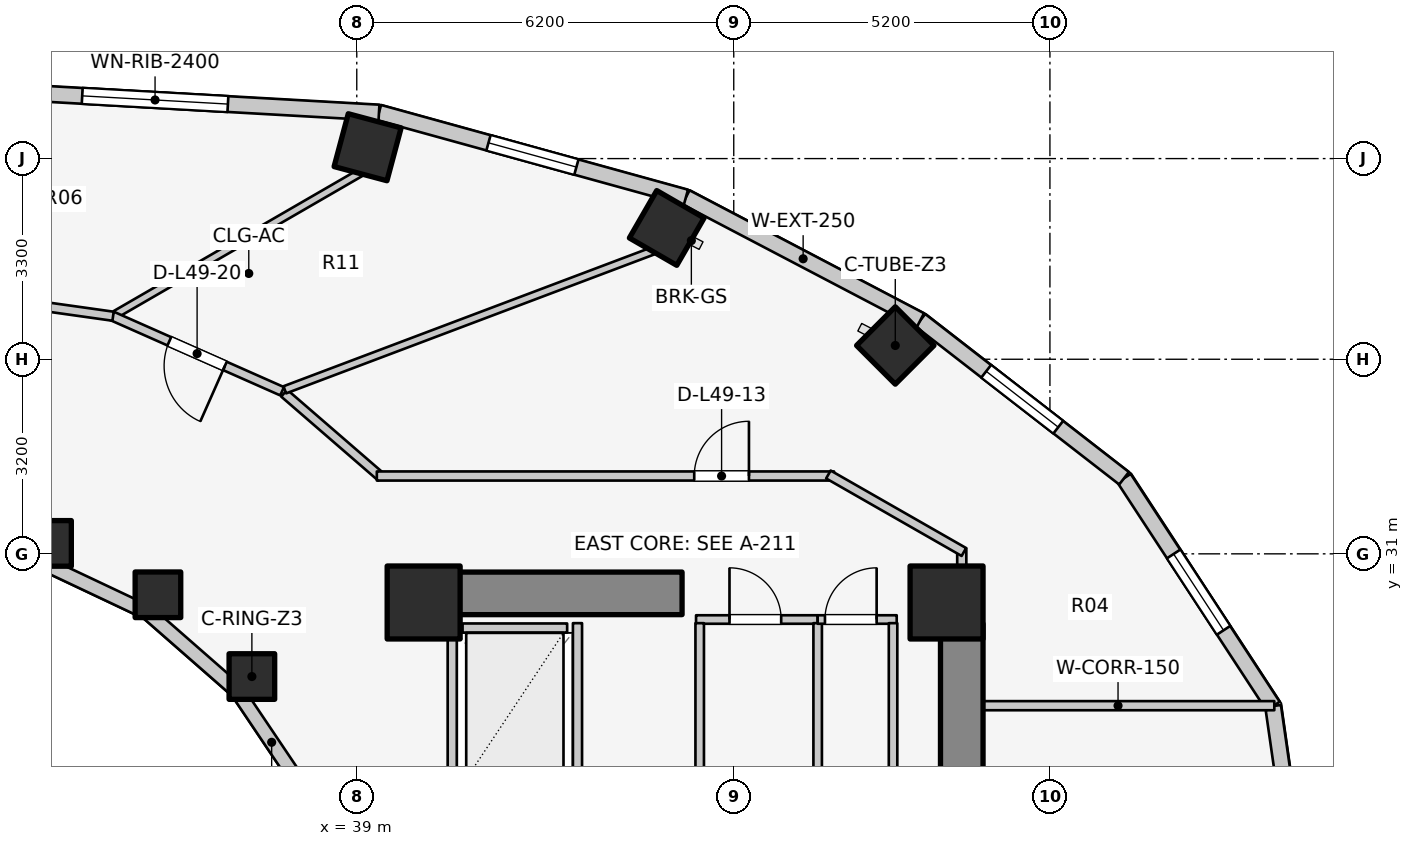
"""IFC4 building model, lengths in metres.
Left out: names, types, materials, properties, quantities, classifications, styles, units other than length and angle.
Written with IfcOpenShell. Run it as: python <this file> out.ifc"""

import sys

from ifc_helpers import new_model, si_unit, direction, frame, frame_2d, origin, origin_2d, place, context, subcontext, project, spatial, rectangle, extrude, element, fill, save


model = new_model("IFC4")
c1 = context("Model", 3, precision=1e-05, world=origin(), true_north=direction((0.0, 1.0)))
c2 = subcontext(c1, "Body", "Model", "MODEL_VIEW")
j1 = project(units=[si_unit("LENGTHUNIT", "METRE"), si_unit("PLANEANGLEUNIT", "RADIAN")], contexts=[c1])
p1 = place(None, origin())
s1 = spatial("IfcSite", under=j1, at=p1, CompositionType="ELEMENT")
p2 = place(p1, origin())
s2 = spatial("IfcBuilding", under=s1, at=p2, CompositionType="ELEMENT")
p3 = place(p2, frame((0.0, 0.0, 162.2)))
s3 = spatial("IfcBuildingStorey", under=s2, at=p3, CompositionType="ELEMENT", Elevation=162.2)
p4 = place(p3, frame((48.95, 17.05, 0.0), z_axis=(0.0, 0.0, 1.0), x_axis=(0.0, 1.0, 0.0)))
e1 = element("IfcWall", 1, at=p4, inside=s3, PredefinedType="SHEAR", context=c2, shape_type="SweptSolid", body=[
    extrude(rectangle(XDim=12.8, YDim=0.7, at=frame_2d((6.4, 0.0))), origin(), (0.0, 0.0, 1.0), 3.1),
])
p5 = place(p3, frame((39.85, 30.35, 0.0), z_axis=(0.0, 0.0, 1.0), x_axis=(1.0, 0.0, 0.0)))
e2 = element("IfcWall", 2, at=p5, inside=s3, PredefinedType="SHEAR", context=c2, shape_type="SweptSolid", body=[
    extrude(rectangle(XDim=4.5, YDim=0.7, at=frame_2d((2.25, 0.0))), origin(), (0.0, 0.0, 1.0), 3.1),
])
for number, where, z_axis, x_axis in (
    (3, (48.7, 30.2, 0.0), (0.0, 0.0, 1.0), (1.0, 0.0, 0.0)),
    (4, (40.1, 30.2, 0.0), (0.0, 0.0, 1.0), (1.0, 0.0, 0.0)),
):
    element("IfcColumn", number, at=place(p3, frame(where, z_axis=z_axis, x_axis=x_axis)), inside=s3, PredefinedType="COLUMN", context=c2, shape_type="SweptSolid", body=[
        extrude(rectangle(XDim=1.2, YDim=1.2, at=origin_2d()), origin(), (0.0, 0.0, 1.0), 3.1),
    ])
p6 = place(p3, frame((37.275, 28.982, 0.0), z_axis=(0.0, 0.0, 1.0), x_axis=(1.0, 0.0, 0.0)))
e5 = element("IfcColumn", 5, at=p6, inside=s3, PredefinedType="COLUMN", context=c2, shape_type="SweptSolid", body=[
    extrude(rectangle(XDim=0.75, YDim=0.75, at=origin_2d()), origin(), (0.0, 0.0, 1.0), 3.1),
])
p7 = place(p3, frame((47.857, 34.427, 0.0), z_axis=(0.0, 0.0, 1.0), x_axis=(0.707106781187, 0.707106781187, 0.0)))
e6 = element("IfcColumn", 6, at=p7, inside=s3, PredefinedType="COLUMN", context=c2, shape_type="SweptSolid", body=[
    extrude(rectangle(XDim=0.9, YDim=0.9, at=origin_2d()), origin(), (0.0, 0.0, 1.0), 3.1),
])
p8 = place(p3, frame((35.73, 30.327, 0.0), z_axis=(0.0, 0.0, 1.0), x_axis=(1.0, 0.0, 0.0)))
e7 = element("IfcColumn", 7, at=p8, inside=s3, PredefinedType="COLUMN", context=c2, shape_type="SweptSolid", body=[
    extrude(rectangle(XDim=0.75, YDim=0.75, at=origin_2d()), origin(), (0.0, 0.0, 1.0), 3.1),
])
p9 = place(p3, frame((44.098, 36.359, 0.0), z_axis=(0.0, 0.0, 1.0), x_axis=(0.5, 0.866025403784, 0.0)))
e8 = element("IfcColumn", 8, at=p9, inside=s3, PredefinedType="COLUMN", context=c2, shape_type="SweptSolid", body=[
    extrude(rectangle(XDim=0.9, YDim=0.9, at=origin_2d()), origin(), (0.0, 0.0, 1.0), 3.1),
])
p10 = place(p3, frame((33.931, 31.172, 0.0), z_axis=(0.0, 0.0, 1.0), x_axis=(1.0, 0.0, 0.0)))
e9 = element("IfcColumn", 9, at=p10, inside=s3, PredefinedType="COLUMN", context=c2, shape_type="SweptSolid", body=[
    extrude(rectangle(XDim=0.75, YDim=0.75, at=origin_2d()), origin(), (0.0, 0.0, 1.0), 3.1),
])
p11 = place(p3, frame((39.178, 37.687, 0.0), z_axis=(0.0, 0.0, 1.0), x_axis=(0.258819045103, 0.965925826289, 0.0)))
e10 = element("IfcColumn", 10, at=p11, inside=s3, PredefinedType="COLUMN", context=c2, shape_type="SweptSolid", body=[
    extrude(rectangle(XDim=0.9, YDim=0.9, at=origin_2d()), origin(), (0.0, 0.0, 1.0), 3.1),
])
p12 = place(p3, frame((38.166, 27.06, 0.0), z_axis=(0.0, 0.0, 1.0), x_axis=(-0.558197800898, 0.829707909492, 0.0)))
e11 = element("IfcWall", 11, at=p12, inside=s3, PredefinedType="STANDARD", context=c2, shape_type="SweptSolid", body=[
    extrude(rectangle(XDim=2.027, YDim=0.23, at=frame_2d((1.013, 0.0))), origin(), (0.0, 0.0, 1.0), 2.16),
])
p13 = place(p3, frame((37.035, 28.742, 0.0), z_axis=(0.0, 0.0, 1.0), x_axis=(-0.752576694707, 0.658504607869, 0.0)))
e12 = element("IfcWall", 12, at=p13, inside=s3, PredefinedType="STANDARD", context=c2, shape_type="SweptSolid", body=[
    extrude(rectangle(XDim=1.959, YDim=0.23, at=frame_2d((0.98, 0.0))), origin(), (0.0, 0.0, 1.0), 2.16),
])
p14 = place(p3, frame((35.56, 30.032, 0.0), z_axis=(0.0, 0.0, 1.0), x_axis=(-0.904179699603, 0.427152280606, 0.0)))
e13 = element("IfcWall", 13, at=p14, inside=s3, PredefinedType="STANDARD", context=c2, shape_type="SweptSolid", body=[
    extrude(rectangle(XDim=1.899, YDim=0.23, at=frame_2d((0.95, 0.0))), origin(), (0.0, 0.0, 1.0), 2.16),
])
p15 = place(p3, frame((54.86, 23.0, 0.0), z_axis=(0.0, 0.0, 1.0), x_axis=(-0.142227632286, 0.989833976288, 0.0)))
e14 = element("IfcWall", 14, at=p15, inside=s3, PredefinedType="STANDARD", context=c2, shape_type="SweptSolid", body=[
    extrude(rectangle(XDim=5.553, YDim=0.26, at=frame_2d((2.776, 0.0))), origin(), (0.0, 0.0, 1.0), 2.85),
])
p16 = place(p15, frame((2.027, 0.0, 0.75)))
e15 = element("IfcOpeningElement", 15, at=p16, cuts=e14, PredefinedType="OPENING", context=c2, shape_type="SweptSolid", body=[
    extrude(rectangle(XDim=1.5, YDim=1.6, at=frame_2d((0.75, 0.8))), frame((0.0, 0.14, 0.0), z_axis=(0.0, -1.0, 0.0), x_axis=(1.0, 0.0, 0.0)), (0.0, 0.0, 1.0), 0.28),
])
p17 = place(p3, frame((54.07, 28.497, 0.0), z_axis=(0.0, 0.0, 1.0), x_axis=(-0.547456494366, 0.836834145322, 0.0)))
e16 = element("IfcWall", 16, at=p17, inside=s3, PredefinedType="STANDARD", context=c2, shape_type="SweptSolid", body=[
    extrude(rectangle(XDim=4.477, YDim=0.26, at=frame_2d((2.239, 0.0))), origin(), (0.0, 0.0, 1.0), 2.85),
])
p18 = place(p17, frame((1.489, 0.0, 0.75)))
e17 = element("IfcOpeningElement", 17, at=p18, cuts=e16, PredefinedType="OPENING", context=c2, shape_type="SweptSolid", body=[
    extrude(rectangle(XDim=1.5, YDim=1.6, at=frame_2d((0.75, 0.8))), frame((0.0, 0.14, 0.0), z_axis=(0.0, -1.0, 0.0), x_axis=(1.0, 0.0, 0.0)), (0.0, 0.0, 1.0), 0.28),
])
p19 = place(p3, frame((51.619, 32.243, 0.0), z_axis=(0.0, 0.0, 1.0), x_axis=(-0.790185650662, 0.612867552973, 0.0)))
e18 = element("IfcWall", 18, at=p19, inside=s3, PredefinedType="STANDARD", context=c2, shape_type="SweptSolid", body=[
    extrude(rectangle(XDim=4.239, YDim=0.26, at=frame_2d((2.12, 0.0))), origin(), (0.0, 0.0, 1.0), 2.85),
])
p20 = place(p19, frame((1.37, 0.0, 0.75)))
e19 = element("IfcOpeningElement", 19, at=p20, cuts=e18, PredefinedType="OPENING", context=c2, shape_type="SweptSolid", body=[
    extrude(rectangle(XDim=1.5, YDim=1.6, at=frame_2d((0.75, 0.8))), frame((0.0, 0.14, 0.0), z_axis=(0.0, -1.0, 0.0), x_axis=(1.0, 0.0, 0.0)), (0.0, 0.0, 1.0), 0.28),
])
p21 = place(p3, frame((48.269, 34.842, 0.0), z_axis=(0.0, 0.0, 1.0), x_axis=(-0.885660265226, 0.464333818065, 0.0)))
e20 = element("IfcWall", 20, at=p21, inside=s3, PredefinedType="STANDARD", context=c2, shape_type="SweptSolid", body=[
    extrude(rectangle(XDim=4.354, YDim=0.26, at=frame_2d((2.177, 0.0))), origin(), (0.0, 0.0, 1.0), 2.85),
])
p22 = place(p3, frame((44.413, 36.863, 0.0), z_axis=(0.0, 0.0, 1.0), x_axis=(-0.963953455704, 0.26607092144, 0.0)))
e21 = element("IfcWall", 21, at=p22, inside=s3, PredefinedType="STANDARD", context=c2, shape_type="SweptSolid", body=[
    extrude(rectangle(XDim=5.237, YDim=0.26, at=frame_2d((2.618, 0.0))), origin(), (0.0, 0.0, 1.0), 2.85),
])
p23 = place(p22, frame((1.868, 0.0, 0.75)))
e22 = element("IfcOpeningElement", 22, at=p23, cuts=e21, PredefinedType="OPENING", context=c2, shape_type="SweptSolid", body=[
    extrude(rectangle(XDim=1.5, YDim=1.6, at=frame_2d((0.75, 0.8))), frame((0.0, 0.14, 0.0), z_axis=(0.0, -1.0, 0.0), x_axis=(1.0, 0.0, 0.0)), (0.0, 0.0, 1.0), 0.28),
])
p24 = place(p3, frame((39.365, 38.257, 0.0), z_axis=(0.0, 0.0, 1.0), x_axis=(-0.998417906562, 0.056228852534, 0.0)))
e23 = element("IfcWall", 23, at=p24, inside=s3, PredefinedType="STANDARD", context=c2, shape_type="SweptSolid", body=[
    extrude(rectangle(XDim=7.377, YDim=0.26, at=frame_2d((3.688, 0.0))), origin(), (0.0, 0.0, 1.0), 2.85),
])
p25 = place(p24, frame((2.488, 0.0, 0.75)))
e24 = element("IfcOpeningElement", 24, at=p25, cuts=e23, PredefinedType="OPENING", context=c2, shape_type="SweptSolid", body=[
    extrude(rectangle(XDim=2.4, YDim=1.7, at=frame_2d((1.2, 0.85))), frame((0.0, 0.14, 0.0), z_axis=(0.0, -1.0, 0.0), x_axis=(1.0, 0.0, 0.0)), (0.0, 0.0, 1.0), 0.28),
])
p26 = place(p3, frame((40.74, 29.78, 0.0), z_axis=(0.0, 0.0, 1.0), x_axis=(1.0, 0.0, 0.0)))
e25 = element("IfcWall", 25, at=p26, inside=s3, PredefinedType="SOLIDWALL", context=c2, shape_type="SweptSolid", body=[
    extrude(rectangle(XDim=1.72, YDim=0.15, at=frame_2d((0.86, 0.0))), origin(), (0.0, 0.0, 1.0), 2.855),
])
for number, where, z_axis, x_axis in (
    (26, (40.57, 27.14, 0.0), (0.0, 0.0, 1.0), (0.0, 1.0, 0.0)),
    (27, (42.63, 27.14, 0.0), (0.0, 0.0, 1.0), (0.0, 1.0, 0.0)),
):
    element("IfcWall", number, at=place(p3, frame(where, z_axis=z_axis, x_axis=x_axis)), inside=s3, PredefinedType="SOLIDWALL", context=c2, shape_type="SweptSolid", body=[
        extrude(rectangle(XDim=2.72, YDim=0.15, at=frame_2d((1.36, 0.0))), origin(), (0.0, 0.0, 1.0), 2.855),
    ])
p27 = place(p3, frame((44.58, 29.92, 0.0), z_axis=(0.0, 0.0, 1.0), x_axis=(1.0, 0.0, 0.0)))
e28 = element("IfcWall", 28, at=p27, inside=s3, PredefinedType="PLUMBINGWALL", context=c2, shape_type="SweptSolid", body=[
    extrude(rectangle(XDim=2.0, YDim=0.14, at=frame_2d((1.0, 0.0))), origin(), (0.0, 0.0, 1.0), 2.855),
])
p28 = place(p27, frame((0.55, 0.0, 0.0)))
e29 = element("IfcOpeningElement", 29, at=p28, cuts=e28, PredefinedType="OPENING", context=c2, shape_type="SweptSolid", body=[
    extrude(rectangle(XDim=0.85, YDim=2.05, at=frame_2d((0.425, 1.025))), frame((0.0, 0.08, 0.0), z_axis=(0.0, -1.0, 0.0), x_axis=(1.0, 0.0, 0.0)), (0.0, 0.0, 1.0), 0.16),
])
for number, where, z_axis, x_axis in (
    (30, (44.64, 25.98, 0.0), (0.0, 0.0, 1.0), (0.0, 1.0, 0.0)),
    (31, (46.58, 25.98, 0.0), (0.0, 0.0, 1.0), (0.0, 1.0, 0.0)),
):
    element("IfcWall", number, at=place(p3, frame(where, z_axis=z_axis, x_axis=x_axis)), inside=s3, PredefinedType="PLUMBINGWALL", context=c2, shape_type="SweptSolid", body=[
        extrude(rectangle(XDim=3.88, YDim=0.14, at=frame_2d((1.94, 0.0))), origin(), (0.0, 0.0, 1.0), 2.855),
    ])
p29 = place(p3, frame((46.58, 29.92, 0.0), z_axis=(0.0, 0.0, 1.0), x_axis=(1.0, 0.0, 0.0)))
e32 = element("IfcWall", 32, at=p29, inside=s3, PredefinedType="PLUMBINGWALL", context=c2, shape_type="SweptSolid", body=[
    extrude(rectangle(XDim=1.3, YDim=0.14, at=frame_2d((0.65, 0.0))), origin(), (0.0, 0.0, 1.0), 2.855),
])
p30 = place(p29, frame((0.12, 0.0, 0.0)))
e33 = element("IfcOpeningElement", 33, at=p30, cuts=e32, PredefinedType="OPENING", context=c2, shape_type="SweptSolid", body=[
    extrude(rectangle(XDim=0.85, YDim=2.05, at=frame_2d((0.425, 1.025))), frame((0.0, 0.08, 0.0), z_axis=(0.0, -1.0, 0.0), x_axis=(1.0, 0.0, 0.0)), (0.0, 0.0, 1.0), 0.16),
])
p31 = place(p3, frame((47.82, 25.98, 0.0), z_axis=(0.0, 0.0, 1.0), x_axis=(0.0, 1.0, 0.0)))
e34 = element("IfcWall", 34, at=p31, inside=s3, PredefinedType="PLUMBINGWALL", context=c2, shape_type="SweptSolid", body=[
    extrude(rectangle(XDim=3.88, YDim=0.14, at=frame_2d((1.94, 0.0))), origin(), (0.0, 0.0, 1.0), 2.855),
])
p32 = place(p3, frame((48.95, 28.503, 0.0), z_axis=(0.0, 0.0, 1.0), x_axis=(1.0, 0.0, 0.0)))
e35 = element("IfcWall", 35, at=p32, inside=s3, PredefinedType="PARTITIONING", context=c2, shape_type="SweptSolid", body=[
    extrude(rectangle(XDim=5.14, YDim=0.15, at=frame_2d((2.57, 0.0))), origin(), (0.0, 0.0, 1.0), 2.855),
])
p33 = place(p3, frame((48.95, 29.8, 0.0), z_axis=(0.0, 0.0, 1.0), x_axis=(0.0, 1.0, 0.0)))
e36 = element("IfcWall", 36, at=p33, inside=s3, PredefinedType="PARTITIONING", context=c2, shape_type="SweptSolid", body=[
    extrude(rectangle(XDim=1.29, YDim=0.15, at=frame_2d((0.645, 0.0))), origin(), (0.0, 0.0, 1.0), 2.855),
])
p34 = place(p3, frame((37.807, 33.642, 0.0), z_axis=(0.0, 0.0, 1.0), x_axis=(0.756055312247, -0.654507727092, 0.0)))
e37 = element("IfcWall", 37, at=p34, inside=s3, PredefinedType="PARTITIONING", context=c2, shape_type="SweptSolid", body=[
    extrude(rectangle(XDim=2.111, YDim=0.15, at=frame_2d((1.055, 0.0))), origin(), (0.0, 0.0, 1.0), 2.299),
])
p35 = place(p3, frame((39.33, 32.28, 0.0), z_axis=(0.0, 0.0, 1.0), x_axis=(1.0, 0.0, 0.0)))
e38 = element("IfcWall", 38, at=p35, inside=s3, PredefinedType="PARTITIONING", context=c2, shape_type="SweptSolid", body=[
    extrude(rectangle(XDim=7.52, YDim=0.15, at=frame_2d((3.76, 0.0))), origin(), (0.0, 0.0, 1.0), 2.299),
])
p36 = place(p35, frame((5.22, 0.0, 0.0)))
e39 = element("IfcOpeningElement", 39, at=p36, cuts=e38, PredefinedType="OPENING", context=c2, shape_type="SweptSolid", body=[
    extrude(rectangle(XDim=0.9, YDim=2.1, at=frame_2d((0.45, 1.05))), frame((0.0, 0.085, 0.0), z_axis=(0.0, -1.0, 0.0), x_axis=(1.0, 0.0, 0.0)), (0.0, 0.0, 1.0), 0.17),
])
p37 = place(p3, frame((46.757, 32.305, 0.0), z_axis=(0.0, 0.0, 1.0), x_axis=(0.867991349648, -0.496579315857, 0.0)))
e40 = element("IfcWall", 40, at=p37, inside=s3, PredefinedType="PARTITIONING", context=c2, shape_type="SweptSolid", body=[
    extrude(rectangle(XDim=2.567, YDim=0.15, at=frame_2d((1.283, 0.0))), origin(), (0.0, 0.0, 1.0), 2.22),
])
p38 = place(p3, frame((37.816, 33.698, 0.0), z_axis=(0.0, 0.0, 1.0), x_axis=(0.935601484289, 0.353057874288, 0.0)))
e41 = element("IfcWall", 41, at=p38, inside=s3, PredefinedType="PARTITIONING", context=c2, shape_type="SweptSolid", body=[
    extrude(rectangle(XDim=6.484, YDim=0.125, at=frame_2d((3.242, 0.0))), origin(), (0.0, 0.0, 1.0), 2.299),
])
p39 = place(p3, frame((35.032, 34.938, 0.0), z_axis=(0.0, 0.0, 1.0), x_axis=(0.865627016774, 0.500689392568, 0.0)))
e42 = element("IfcWall", 42, at=p39, inside=s3, PredefinedType="PARTITIONING", context=c2, shape_type="SweptSolid", body=[
    extrude(rectangle(XDim=4.662, YDim=0.125, at=frame_2d((2.331, 0.0))), origin(), (0.0, 0.0, 1.0), 2.299),
])
p40 = place(p3, frame((37.772, 33.674, 0.0), z_axis=(0.0, 0.0, 1.0), x_axis=(-0.914324470734, 0.404982422108, 0.0)))
e43 = element("IfcWall", 43, at=p40, inside=s3, PredefinedType="PARTITIONING", context=c2, shape_type="SweptSolid", body=[
    extrude(rectangle(XDim=3.058, YDim=0.15, at=frame_2d((1.529, 0.0))), origin(), (0.0, 0.0, 1.0), 2.299),
])
p41 = place(p40, frame((1.029, 0.0, 0.0)))
e44 = element("IfcOpeningElement", 44, at=p41, cuts=e43, PredefinedType="OPENING", context=c2, shape_type="SweptSolid", body=[
    extrude(rectangle(XDim=1.0, YDim=2.1, at=frame_2d((0.5, 1.05))), frame((0.0, 0.085, 0.0), z_axis=(0.0, -1.0, 0.0), x_axis=(1.0, 0.0, 0.0)), (0.0, 0.0, 1.0), 0.17),
])
p42 = place(p3, frame((34.992, 34.908, 0.0), z_axis=(0.0, 0.0, 1.0), x_axis=(-0.990234341072, 0.139412875167, 0.0)))
e45 = element("IfcWall", 45, at=p42, inside=s3, PredefinedType="PARTITIONING", context=c2, shape_type="SweptSolid", body=[
    extrude(rectangle(XDim=3.03, YDim=0.15, at=frame_2d((1.515, 0.0))), origin(), (0.0, 0.0, 1.0), 2.299),
])
p43 = place(p18, origin())
e46 = element("IfcWindow", 46, at=p43, inside=s3, PartitioningType="SINGLE_PANEL", PredefinedType="WINDOW", context=c2, shape_type="SweptSolid", body=[
    extrude(rectangle(XDim=1.5, YDim=1.6, at=frame_2d((0.75, 0.8))), frame((0.0, 0.03, 0.0), z_axis=(0.0, -1.0, 0.0), x_axis=(1.0, 0.0, 0.0)), (0.0, 0.0, 1.0), 0.06),
])
fill(e17, e46)
p44 = place(p20, origin())
e47 = element("IfcWindow", 47, at=p44, inside=s3, PartitioningType="SINGLE_PANEL", PredefinedType="WINDOW", context=c2, shape_type="SweptSolid", body=[
    extrude(rectangle(XDim=1.5, YDim=1.6, at=frame_2d((0.75, 0.8))), frame((0.0, 0.03, 0.0), z_axis=(0.0, -1.0, 0.0), x_axis=(1.0, 0.0, 0.0)), (0.0, 0.0, 1.0), 0.06),
])
fill(e19, e47)
p45 = place(p23, origin())
e48 = element("IfcWindow", 48, at=p45, inside=s3, PartitioningType="SINGLE_PANEL", PredefinedType="WINDOW", context=c2, shape_type="SweptSolid", body=[
    extrude(rectangle(XDim=1.5, YDim=1.6, at=frame_2d((0.75, 0.8))), frame((0.0, 0.03, 0.0), z_axis=(0.0, -1.0, 0.0), x_axis=(1.0, 0.0, 0.0)), (0.0, 0.0, 1.0), 0.06),
])
fill(e22, e48)
p46 = place(p25, origin())
e49 = element("IfcWindow", 49, at=p46, inside=s3, PartitioningType="SINGLE_PANEL", PredefinedType="WINDOW", context=c2, shape_type="SweptSolid", body=[
    extrude(rectangle(XDim=2.4, YDim=1.7, at=frame_2d((1.2, 0.85))), frame((0.0, 0.03, 0.0), z_axis=(0.0, -1.0, 0.0), x_axis=(1.0, 0.0, 0.0)), (0.0, 0.0, 1.0), 0.06),
])
fill(e24, e49)
p47 = place(p28, origin())
e50 = element("IfcDoor", 50, at=p47, inside=s3, OperationType="SINGLE_SWING_LEFT", PredefinedType="DOOR", context=c2, shape_type="SweptSolid", body=[
    extrude(rectangle(XDim=0.85, YDim=2.05, at=frame_2d((0.425, 1.025))), frame((0.0, 0.025, 0.0), z_axis=(0.0, -1.0, 0.0), x_axis=(1.0, 0.0, 0.0)), (0.0, 0.0, 1.0), 0.05),
])
fill(e29, e50)
p48 = place(p30, origin())
e51 = element("IfcDoor", 51, at=p48, inside=s3, OperationType="SINGLE_SWING_RIGHT", PredefinedType="DOOR", context=c2, shape_type="SweptSolid", body=[
    extrude(rectangle(XDim=0.85, YDim=2.05, at=frame_2d((0.425, 1.025))), frame((0.0, 0.025, 0.0), z_axis=(0.0, -1.0, 0.0), x_axis=(1.0, 0.0, 0.0)), (0.0, 0.0, 1.0), 0.05),
])
fill(e33, e51)
p49 = place(p36, origin())
e52 = element("IfcDoor", 52, at=p49, inside=s3, OperationType="SINGLE_SWING_RIGHT", PredefinedType="DOOR", context=c2, shape_type="SweptSolid", body=[
    extrude(rectangle(XDim=0.9, YDim=2.1, at=frame_2d((0.45, 1.05))), frame((0.0, 0.025, 0.0), z_axis=(0.0, -1.0, 0.0), x_axis=(1.0, 0.0, 0.0)), (0.0, 0.0, 1.0), 0.05),
])
fill(e39, e52)
p50 = place(p41, origin())
e53 = element("IfcDoor", 53, at=p50, inside=s3, OperationType="SINGLE_SWING_LEFT", PredefinedType="DOOR", context=c2, shape_type="SweptSolid", body=[
    extrude(rectangle(XDim=1.0, YDim=2.1, at=frame_2d((0.5, 1.05))), frame((0.0, 0.025, 0.0), z_axis=(0.0, -1.0, 0.0), x_axis=(1.0, 0.0, 0.0)), (0.0, 0.0, 1.0), 0.05),
])
fill(e44, e53)
save(model, sys.argv[1])
